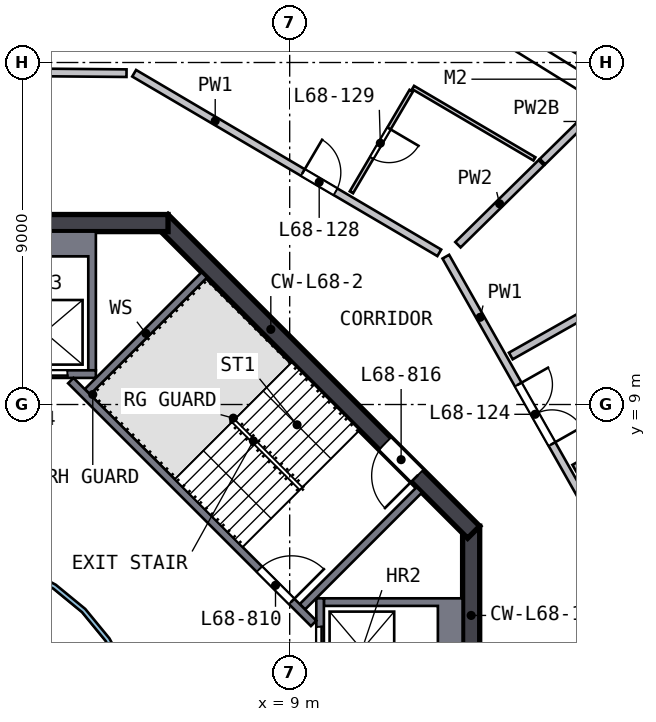
"""IFC4 building model, lengths in metres.
Left out: names, types, materials, properties, quantities, classifications, styles, units other than length and angle.
Written with IfcOpenShell. Run it as: python <this file> out.ifc"""

import sys

from ifc_helpers import new_model, si_unit, direction, frame, frame_2d, origin, place, context, subcontext, project, spatial, polyline, rectangle, outline, extrude, element, fill, save


model = new_model("IFC4")
c1 = context("Model", 3, precision=1e-05, world=origin(), true_north=direction((0.0, 1.0)))
c2 = subcontext(c1, "Body", "Model", "MODEL_VIEW")
j1 = project(units=[si_unit("LENGTHUNIT", "METRE"), si_unit("PLANEANGLEUNIT", "RADIAN")], contexts=[c1])
p1 = place(None, origin())
s1 = spatial("IfcSite", under=j1, at=p1, CompositionType="ELEMENT")
p2 = place(p1, origin())
s2 = spatial("IfcBuilding", under=s1, at=p2, CompositionType="ELEMENT")
p3 = place(p2, frame((0.0, 0.0, 277.5)))
s3 = spatial("IfcBuildingStorey", under=s2, at=p3, CompositionType="ELEMENT", Elevation=277.5)
p4 = place(p3, frame((13.775, -5.799, 0.0), z_axis=(0.0, 0.0, 1.0), x_axis=(0.0, 1.0, 0.0)))
e1 = element("IfcWall", 1, at=p4, inside=s3, PredefinedType="SHEAR", context=c2, shape_type="SweptSolid", body=[
    extrude(rectangle(XDim=11.598, YDim=0.45, at=frame_2d((5.799, 0.0))), origin(), (0.0, 0.0, 1.0), 3.5),
])
p5 = place(p4, frame((4.899, 0.0, 0.0)))
e2 = element("IfcOpeningElement", 2, at=p5, cuts=e1, PredefinedType="OPENING", context=c2, shape_type="SweptSolid", body=[
    extrude(rectangle(XDim=1.8, YDim=2.1, at=frame_2d((0.9, 1.05))), frame((0.0, 0.235, 0.0), z_axis=(0.0, -1.0, 0.0), x_axis=(1.0, 0.0, 0.0)), (0.0, 0.0, 1.0), 0.47),
])
p6 = place(p3, frame((13.841, 5.64, 0.0), z_axis=(0.0, 0.0, 1.0), x_axis=(-0.707106781, 0.707106781, 0.0)))
e3 = element("IfcWall", 3, at=p6, inside=s3, PredefinedType="SHEAR", context=c2, shape_type="SweptSolid", body=[
    extrude(rectangle(XDim=11.598, YDim=0.45, at=frame_2d((5.799, 0.0))), origin(), (0.0, 0.0, 1.0), 3.5),
])
p7 = place(p6, frame((2.099, 0.0, 0.0)))
e4 = element("IfcOpeningElement", 4, at=p7, cuts=e3, PredefinedType="OPENING", context=c2, shape_type="SweptSolid", body=[
    extrude(rectangle(XDim=1.2, YDim=2.1, at=frame_2d((0.6, 1.05))), frame((0.0, 0.235, 0.0), z_axis=(0.0, -1.0, 0.0), x_axis=(1.0, 0.0, 0.0)), (0.0, 0.0, 1.0), 0.47),
])
p8 = place(p3, frame((5.799, 13.775, 0.0), z_axis=(0.0, 0.0, 1.0), x_axis=(-1.0, 0.0, 0.0)))
e5 = element("IfcWall", 5, at=p8, inside=s3, PredefinedType="SHEAR", context=c2, shape_type="SweptSolid", body=[
    extrude(rectangle(XDim=11.598, YDim=0.45, at=frame_2d((5.799, 0.0))), origin(), (0.0, 0.0, 1.0), 3.5),
])
p9 = place(p8, frame((4.899, 0.0, 0.0)))
e6 = element("IfcOpeningElement", 6, at=p9, cuts=e5, PredefinedType="OPENING", context=c2, shape_type="SweptSolid", body=[
    extrude(rectangle(XDim=1.8, YDim=2.1, at=frame_2d((0.9, 1.05))), frame((0.0, 0.235, 0.0), z_axis=(0.0, -1.0, 0.0), x_axis=(1.0, 0.0, 0.0)), (0.0, 0.0, 1.0), 0.47),
])
p10 = place(p3, origin())
e7 = element("IfcWall", 7, at=p10, inside=s3, PredefinedType="SOLIDWALL", context=c2, shape_type="SweptSolid", body=[
    extrude(outline(polyline([(13.55, 3.9), (13.55, 1.2), (9.9, 1.2), (9.9, 1.4), (12.9, 1.4), (12.9, 3.7), (9.9, 3.7), (9.9, 3.9), (13.55, 3.9)])), origin(), (0.0, 0.0, 1.0), 3.19),
])
p11 = place(p3, frame((9.8, 1.2, 0.0), z_axis=(0.0, 0.0, 1.0), x_axis=(0.0, 1.0, 0.0)))
e8 = element("IfcWall", 8, at=p11, inside=s3, PredefinedType="SOLIDWALL", context=c2, shape_type="SweptSolid", body=[
    extrude(rectangle(XDim=2.7, YDim=0.2, at=frame_2d((1.35, 0.0))), origin(), (0.0, 0.0, 1.0), 3.19),
])
p12 = place(p11, frame((0.75, 0.0, 0.0)))
e9 = element("IfcOpeningElement", 9, at=p12, cuts=e8, PredefinedType="OPENING", context=c2, shape_type="SweptSolid", body=[
    extrude(rectangle(XDim=1.2, YDim=2.1, at=frame_2d((0.6, 1.05))), frame((0.0, 0.11, 0.0), z_axis=(0.0, -1.0, 0.0), x_axis=(1.0, 0.0, 0.0)), (0.0, 0.0, 1.0), 0.22),
])
p13 = place(p3, origin())
e10 = element("IfcWall", 10, at=p13, inside=s3, PredefinedType="SOLIDWALL", context=c2, shape_type="SweptSolid", body=[
    extrude(outline(polyline([(3.9, 9.9), (3.7, 9.9), (3.7, 12.9), (1.4, 12.9), (1.4, 9.9), (1.2, 9.9), (1.2, 13.55), (3.9, 13.55), (3.9, 9.9)])), origin(), (0.0, 0.0, 1.0), 3.19),
])
p14 = place(p3, frame((1.2, 9.8, 0.0), z_axis=(0.0, 0.0, 1.0), x_axis=(1.0, 0.0, 0.0)))
e11 = element("IfcWall", 11, at=p14, inside=s3, PredefinedType="SOLIDWALL", context=c2, shape_type="SweptSolid", body=[
    extrude(rectangle(XDim=2.7, YDim=0.2, at=frame_2d((1.35, 0.0))), origin(), (0.0, 0.0, 1.0), 3.19),
])
p15 = place(p14, frame((0.75, 0.0, 0.0)))
e12 = element("IfcOpeningElement", 12, at=p15, cuts=e11, PredefinedType="OPENING", context=c2, shape_type="SweptSolid", body=[
    extrude(rectangle(XDim=1.2, YDim=2.1, at=frame_2d((0.6, 1.05))), frame((0.0, 0.11, 0.0), z_axis=(0.0, -1.0, 0.0), x_axis=(1.0, 0.0, 0.0)), (0.0, 0.0, 1.0), 0.22),
])
p16 = place(p3, frame((3.24, 9.629, 0.0), z_axis=(0.0, 0.0, 1.0), x_axis=(0.707106781, -0.707106781, 0.0)))
e13 = element("IfcWall", 13, at=p16, inside=s3, PredefinedType="SOLIDWALL", context=c2, shape_type="SweptSolid", body=[
    extrude(rectangle(XDim=9.036, YDim=0.2, at=frame_2d((4.518, 0.0))), origin(), (0.0, 0.0, 1.0), 3.19),
])
p17 = place(p16, frame((7.018, 0.0, 0.0)))
e14 = element("IfcOpeningElement", 14, at=p17, cuts=e13, PredefinedType="OPENING", context=c2, shape_type="SweptSolid", body=[
    extrude(rectangle(XDim=1.2, YDim=2.1, at=frame_2d((0.6, 1.05))), frame((0.0, 0.11, 0.0), z_axis=(0.0, -1.0, 0.0), x_axis=(1.0, 0.0, 0.0)), (0.0, 0.0, 1.0), 0.22),
])
for number, where, z_axis, x_axis in (
    (15, (9.334, 3.677, 0.0), (0.0, 0.0, 1.0), (0.707, 0.707, 0.0)),
    (16, (3.677, 9.334, 0.0), (0.0, 0.0, 1.0), (0.707, 0.707, 0.0)),
):
    element("IfcWall", number, at=place(p3, frame(where, z_axis=z_axis, x_axis=x_axis)), inside=s3, PredefinedType="SOLIDWALL", context=c2, shape_type="SweptSolid", body=[
        extrude(rectangle(XDim=4.35, YDim=0.2, at=frame_2d((2.175, 0.0))), origin(), (0.0, 0.0, 1.0), 3.19),
    ])
p18 = place(p3, origin())
e17 = element("IfcWall", 17, at=p18, inside=s3, PredefinedType="SOLIDWALL", context=c2, shape_type="SweptSolid", body=[
    extrude(outline(polyline([(5.021, -0.999), (4.73, -1.959), (4.257, -2.844), (3.62, -3.62), (2.844, -4.257), (1.959, -4.73), (0.999, -5.021), (0.0, -5.12), (-0.999, -5.021), (-1.959, -4.73), (-2.844, -4.257), (-3.62, -3.62), (-4.257, -2.844), (-4.73, -1.959), (-5.021, -0.999), (-5.12, 0.0), (-5.021, 0.999), (-4.73, 1.959), (-4.257, 2.844), (-3.62, 3.62), (-2.844, 4.257), (-1.959, 4.73), (-0.999, 5.021), (0.0, 5.12), (0.999, 5.021), (1.959, 4.73), (2.844, 4.257), (3.62, 3.62), (4.257, 2.844), (4.73, 1.959), (5.021, 0.999), (5.12, 0.0), (5.021, -0.999)]), holes=[polyline([(4.904, 0.976), (4.619, 1.913), (4.157, 2.778), (3.535, 3.535), (2.778, 4.157), (1.913, 4.619), (0.976, 4.904), (0.0, 5.0), (-0.976, 4.904), (-1.913, 4.619), (-2.778, 4.157), (-3.535, 3.535), (-4.157, 2.778), (-4.619, 1.913), (-4.904, 0.976), (-5.0, 0.0), (-4.904, -0.976), (-4.619, -1.913), (-4.157, -2.778), (-3.535, -3.535), (-2.778, -4.157), (-1.913, -4.619), (-0.976, -4.904), (0.0, -5.0), (0.976, -4.904), (1.913, -4.619), (2.778, -4.157), (3.535, -3.535), (4.157, -2.778), (4.619, -1.913), (4.904, -0.976), (5.0, 0.0), (4.904, 0.976)])]), origin(), (0.0, 0.0, 1.0), 3.19),
])
p19 = place(p3, frame((-4.609, 17.798, 0.0), z_axis=(0.0, 0.0, 1.0), x_axis=(0.999964836, -0.008386109, 0.0)))
e18 = element("IfcWall", 18, at=p19, inside=s3, PredefinedType="SOLIDWALL", context=c2, shape_type="SweptSolid", body=[
    extrude(rectangle(XDim=9.316, YDim=0.2, at=frame_2d((4.658, 0.0))), origin(), (0.0, 0.0, 1.0), 3.19),
])
p20 = place(p19, frame((1.9, 0.0, 0.0)))
e19 = element("IfcOpeningElement", 19, at=p20, cuts=e18, PredefinedType="OPENING", context=c2, shape_type="SweptSolid", body=[
    extrude(rectangle(XDim=1.0, YDim=2.1, at=frame_2d((0.5, 1.05))), frame((0.0, 0.11, 0.0), z_axis=(0.0, -1.0, 0.0), x_axis=(1.0, 0.0, 0.0)), (0.0, 0.0, 1.0), 0.22),
])
p21 = place(p3, frame((4.907, 17.718, 0.0), z_axis=(0.0, 0.0, 1.0), x_axis=(0.861809555, -0.507231989, 0.0)))
e20 = element("IfcWall", 20, at=p21, inside=s3, PredefinedType="SOLIDWALL", context=c2, shape_type="SweptSolid", body=[
    extrude(rectangle(XDim=9.316, YDim=0.2, at=frame_2d((4.658, 0.0))), origin(), (0.0, 0.0, 1.0), 3.19),
])
p22 = place(p21, frame((5.15, 0.0, 0.0)))
e21 = element("IfcOpeningElement", 21, at=p22, cuts=e20, PredefinedType="OPENING", context=c2, shape_type="SweptSolid", body=[
    extrude(rectangle(XDim=1.0, YDim=2.1, at=frame_2d((0.5, 1.05))), frame((0.0, 0.11, 0.0), z_axis=(0.0, -1.0, 0.0), x_axis=(1.0, 0.0, 0.0)), (0.0, 0.0, 1.0), 0.22),
])
p23 = place(p3, frame((13.108, 12.891, 0.0), z_axis=(0.0, 0.0, 1.0), x_axis=(0.492734216, -0.870179862, 0.0)))
e22 = element("IfcWall", 22, at=p23, inside=s3, PredefinedType="SOLIDWALL", context=c2, shape_type="SweptSolid", body=[
    extrude(rectangle(XDim=9.517, YDim=0.2, at=frame_2d((4.758, 0.0))), origin(), (0.0, 0.0, 1.0), 3.19),
])
p24 = place(p23, frame((3.867, 0.0, 0.0)))
e23 = element("IfcOpeningElement", 23, at=p24, cuts=e22, PredefinedType="OPENING", context=c2, shape_type="SweptSolid", body=[
    extrude(rectangle(XDim=1.8, YDim=2.1, at=frame_2d((0.9, 1.05))), frame((0.0, 0.11, 0.0), z_axis=(0.0, -1.0, 0.0), x_axis=(1.0, 0.0, 0.0)), (0.0, 0.0, 1.0), 0.22),
])
p25 = place(p3, frame((13.427, 13.204, 0.0), z_axis=(0.0, 0.0, 1.0), x_axis=(0.712997217, 0.701166862, 0.0)))
e24 = element("IfcWall", 24, at=p25, inside=s3, PredefinedType="SOLIDWALL", context=c2, shape_type="SweptSolid", body=[
    extrude(rectangle(XDim=3.075, YDim=0.2, at=frame_2d((1.538, 0.0))), origin(), (0.0, 0.0, 1.0), 3.19),
])
p26 = place(p3, frame((15.652, 15.392, 0.0), z_axis=(0.0, 0.0, 1.0), x_axis=(0.713000038, 0.701163994, 0.0)))
e25 = element("IfcWall", 25, at=p26, inside=s3, PredefinedType="SOLIDWALL", context=c2, shape_type="SweptSolid", body=[
    extrude(rectangle(XDim=3.011, YDim=0.2, at=frame_2d((1.506, 0.0))), origin(), (0.0, 0.0, 1.0), 2.69),
])
p27 = place(p3, frame((14.818, 10.277, 0.0), z_axis=(0.0, 0.0, 1.0), x_axis=(0.870181146, 0.492731948, 0.0)))
e26 = element("IfcWall", 26, at=p27, inside=s3, PredefinedType="SOLIDWALL", context=c2, shape_type="SweptSolid", body=[
    extrude(rectangle(XDim=10.252, YDim=0.2, at=frame_2d((5.126, 0.0))), origin(), (0.0, 0.0, 1.0), 3.19),
])
p28 = place(p27, frame((2.95, 0.0, 0.0)))
e27 = element("IfcOpeningElement", 27, at=p28, cuts=e26, PredefinedType="OPENING", context=c2, shape_type="SweptSolid", body=[
    extrude(rectangle(XDim=1.0, YDim=2.1, at=frame_2d((0.5, 1.05))), frame((0.0, 0.11, 0.0), z_axis=(0.0, -1.0, 0.0), x_axis=(1.0, 0.0, 0.0)), (0.0, 0.0, 1.0), 0.22),
])
p29 = place(p3, frame((25.411, 12.377, 0.0), z_axis=(0.0, 0.0, 1.0), x_axis=(-0.870181146, -0.492731948, 0.0)))
e28 = element("IfcWall", 28, at=p29, inside=s3, PredefinedType="SOLIDWALL", context=c2, shape_type="SweptSolid", body=[
    extrude(rectangle(XDim=10.252, YDim=0.2, at=frame_2d((5.126, 0.0))), origin(), (0.0, 0.0, 1.0), 3.19),
])
p30 = place(p29, frame((2.45, 0.0, 0.0)))
e29 = element("IfcOpeningElement", 29, at=p30, cuts=e28, PredefinedType="OPENING", context=c2, shape_type="SweptSolid", body=[
    extrude(rectangle(XDim=1.0, YDim=2.1, at=frame_2d((0.5, 1.05))), frame((0.0, 0.11, 0.0), z_axis=(0.0, -1.0, 0.0), x_axis=(1.0, 0.0, 0.0)), (0.0, 0.0, 1.0), 0.22),
])
p31 = place(p3, frame((12.197, 17.256, 0.0), z_axis=(0.0, 0.0, 1.0), x_axis=(-0.5072507, -0.861798542, 0.0)))
e30 = element("IfcWall", 30, at=p31, inside=s3, PredefinedType="PARTITIONING", context=c2, shape_type="SweptSolid", body=[
    extrude(rectangle(XDim=3.1, YDim=0.1, at=frame_2d((1.55, 0.0))), origin(), (0.0, 0.0, 1.0), 3.19),
])
p32 = place(p31, frame((1.15, 0.0, 0.0)))
e31 = element("IfcOpeningElement", 31, at=p32, cuts=e30, PredefinedType="OPENING", context=c2, shape_type="SweptSolid", body=[
    extrude(rectangle(XDim=0.9, YDim=2.1, at=frame_2d((0.45, 1.05))), frame((0.0, 0.06, 0.0), z_axis=(0.0, -1.0, 0.0), x_axis=(1.0, 0.0, 0.0)), (0.0, 0.0, 1.0), 0.12),
])
p33 = place(p3, frame((12.248, 17.343, 0.0), z_axis=(0.0, 0.0, 1.0), x_axis=(0.861795243, -0.507256305, 0.0)))
e32 = element("IfcWall", 32, at=p33, inside=s3, PredefinedType="PARTITIONING", context=c2, shape_type="SweptSolid", body=[
    extrude(rectangle(XDim=3.704, YDim=0.1, at=frame_2d((1.852, 0.0))), origin(), (0.0, 0.0, 1.0), 3.19),
])
p34 = place(p12, origin())
e33 = element("IfcDoor", 33, at=p34, inside=s3, OperationType="DOUBLE_DOOR_SLIDING", PredefinedType="DOOR", context=c2, shape_type="SweptSolid", body=[
    extrude(rectangle(XDim=1.2, YDim=2.1, at=frame_2d((0.6, 1.05))), frame((0.0, 0.025, 0.0), z_axis=(0.0, -1.0, 0.0), x_axis=(1.0, 0.0, 0.0)), (0.0, 0.0, 1.0), 0.05),
])
fill(e9, e33)
p35 = place(p15, origin())
e34 = element("IfcDoor", 34, at=p35, inside=s3, OperationType="DOUBLE_DOOR_SLIDING", PredefinedType="DOOR", context=c2, shape_type="SweptSolid", body=[
    extrude(rectangle(XDim=1.2, YDim=2.1, at=frame_2d((0.6, 1.05))), frame((0.0, 0.025, 0.0), z_axis=(0.0, -1.0, 0.0), x_axis=(1.0, 0.0, 0.0)), (0.0, 0.0, 1.0), 0.05),
])
fill(e12, e34)
p36 = place(p17, origin())
e35 = element("IfcDoor", 35, at=p36, inside=s3, OperationType="SINGLE_SWING_RIGHT", PredefinedType="DOOR", context=c2, shape_type="SweptSolid", body=[
    extrude(rectangle(XDim=1.2, YDim=2.1, at=frame_2d((0.6, 1.05))), frame((0.0, 0.025, 0.0), z_axis=(0.0, -1.0, 0.0), x_axis=(1.0, 0.0, 0.0)), (0.0, 0.0, 1.0), 0.05),
])
fill(e14, e35)
p37 = place(p7, origin())
e36 = element("IfcDoor", 36, at=p37, inside=s3, OperationType="SINGLE_SWING_LEFT", PredefinedType="DOOR", context=c2, shape_type="SweptSolid", body=[
    extrude(rectangle(XDim=1.2, YDim=2.1, at=frame_2d((0.6, 1.05))), frame((0.0, 0.025, 0.0), z_axis=(0.0, -1.0, 0.0), x_axis=(1.0, 0.0, 0.0)), (0.0, 0.0, 1.0), 0.05),
])
fill(e4, e36)
p38 = place(p24, origin())
e37 = element("IfcDoor", 37, at=p38, inside=s3, OperationType="DOUBLE_DOOR_SINGLE_SWING", PredefinedType="DOOR", context=c2, shape_type="SweptSolid", body=[
    extrude(rectangle(XDim=1.8, YDim=2.1, at=frame_2d((0.9, 1.05))), frame((0.0, 0.025, 0.0), z_axis=(0.0, -1.0, 0.0), x_axis=(1.0, 0.0, 0.0)), (0.0, 0.0, 1.0), 0.05),
])
fill(e23, e37)
p39 = place(p22, origin())
e38 = element("IfcDoor", 38, at=p39, inside=s3, OperationType="SINGLE_SWING_LEFT", PredefinedType="DOOR", context=c2, shape_type="SweptSolid", body=[
    extrude(rectangle(XDim=1.0, YDim=2.1, at=frame_2d((0.5, 1.05))), frame((0.0, 0.025, 0.0), z_axis=(0.0, -1.0, 0.0), x_axis=(1.0, 0.0, 0.0)), (0.0, 0.0, 1.0), 0.05),
])
fill(e21, e38)
p40 = place(p32, origin())
e39 = element("IfcDoor", 39, at=p40, inside=s3, OperationType="SINGLE_SWING_LEFT", PredefinedType="DOOR", context=c2, shape_type="SweptSolid", body=[
    extrude(rectangle(XDim=0.9, YDim=2.1, at=frame_2d((0.45, 1.05))), frame((0.0, 0.025, 0.0), z_axis=(0.0, -1.0, 0.0), x_axis=(1.0, 0.0, 0.0)), (0.0, 0.0, 1.0), 0.05),
])
fill(e31, e39)
save(model, sys.argv[1])
